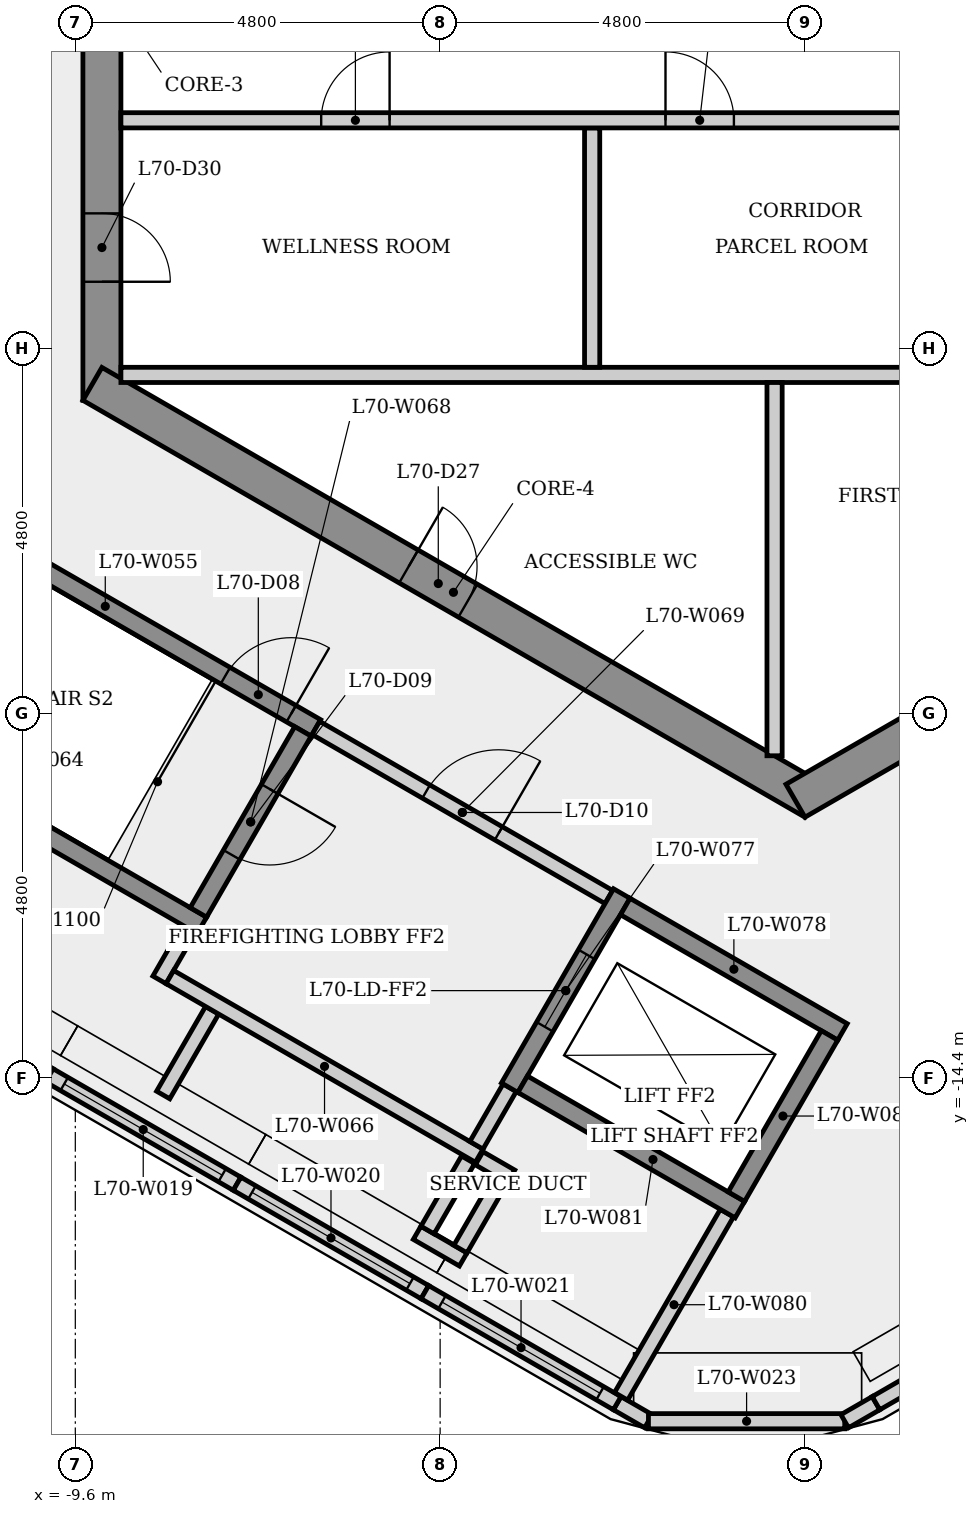
"""IFC4 building model, lengths in metres.
Left out: names, types, materials, properties, quantities, classifications, styles, units other than length and angle.
Written with IfcOpenShell. Run it as: python <this file> out.ifc"""

import sys

from ifc_helpers import new_model, si_unit, direction, frame, frame_2d, origin, place, context, subcontext, project, spatial, rectangle, extrude, element, fill, save


model = new_model("IFC4")
c1 = context("Model", 3, precision=1e-05, world=origin(), true_north=direction((0.0, 1.0)))
c2 = subcontext(c1, "Body", "Model", "MODEL_VIEW")
j1 = project(units=[si_unit("LENGTHUNIT", "METRE"), si_unit("PLANEANGLEUNIT", "RADIAN")], contexts=[c1])
p1 = place(None, origin())
s1 = spatial("IfcSite", under=j1, at=p1, CompositionType="ELEMENT")
p2 = place(p1, origin())
s2 = spatial("IfcBuilding", under=s1, at=p2, CompositionType="ELEMENT")
p3 = place(p2, frame((0.0, 0.0, 262.9)))
s3 = spatial("IfcBuildingStorey", under=s2, at=p3, CompositionType="ELEMENT", Elevation=262.9)
p4 = place(p3, frame((-9.25, 5.485, 0.0), z_axis=(0.0, 0.0, 1.0), x_axis=(0.0, -1.0, 0.0)))
e1 = element("IfcWall", 1, at=p4, inside=s3, PredefinedType="SHEAR", context=c2, shape_type="SweptSolid", body=[
    extrude(rectangle(XDim=10.97, YDim=0.5, at=frame_2d((5.485, 0.0))), origin(), (0.0, 0.0, 1.0), 4.8),
])
p5 = place(p4, frame((8.509, 0.0, 0.0)))
e2 = element("IfcOpeningElement", 2, at=p5, cuts=e1, PredefinedType="OPENING", context=c2, shape_type="SweptSolid", body=[
    extrude(rectangle(XDim=0.9, YDim=2.1, at=frame_2d((0.45, 1.05))), frame((0.0, 0.26, 0.0), z_axis=(0.0, -1.0, 0.0), x_axis=(1.0, 0.0, 0.0)), (0.0, 0.0, 1.0), 0.52),
])
p6 = place(p4, frame((4.685, 0.0, 0.0)))
e3 = element("IfcOpeningElement", 3, at=p6, cuts=e1, PredefinedType="OPENING", context=c2, shape_type="SweptSolid", body=[
    extrude(rectangle(XDim=1.6, YDim=2.1, at=frame_2d((0.8, 1.05))), frame((0.0, 0.26, 0.0), z_axis=(0.0, -1.0, 0.0), x_axis=(1.0, 0.0, 0.0)), (0.0, 0.0, 1.0), 0.52),
])
p7 = place(p3, frame((-9.375, -5.268, 0.0), z_axis=(0.0, 0.0, 1.0), x_axis=(0.866023993627, -0.500002442456, 0.0)))
e4 = element("IfcWall", 4, at=p7, inside=s3, PredefinedType="SHEAR", context=c2, shape_type="SweptSolid", body=[
    extrude(rectangle(XDim=10.97, YDim=0.5, at=frame_2d((5.485, 0.0))), origin(), (0.0, 0.0, 1.0), 4.8),
])
p8 = place(p7, frame((4.804, 0.0, 0.0)))
e5 = element("IfcOpeningElement", 5, at=p8, cuts=e4, PredefinedType="OPENING", context=c2, shape_type="SweptSolid", body=[
    extrude(rectangle(XDim=0.9, YDim=2.1, at=frame_2d((0.45, 1.05))), frame((0.0, 0.26, 0.0), z_axis=(0.0, -1.0, 0.0), x_axis=(1.0, 0.0, 0.0)), (0.0, 0.0, 1.0), 0.52),
])
p9 = place(p3, frame((-0.125, -10.753, 0.0), z_axis=(0.0, 0.0, 1.0), x_axis=(0.866023993627, 0.500002442456, 0.0)))
e6 = element("IfcWall", 6, at=p9, inside=s3, PredefinedType="SHEAR", context=c2, shape_type="SweptSolid", body=[
    extrude(rectangle(XDim=10.97, YDim=0.5, at=frame_2d((5.485, 0.0))), origin(), (0.0, 0.0, 1.0), 4.8),
])
p10 = place(p9, frame((1.918, 0.0, 0.0)))
e7 = element("IfcOpeningElement", 7, at=p10, cuts=e6, PredefinedType="OPENING", context=c2, shape_type="SweptSolid", body=[
    extrude(rectangle(XDim=0.9, YDim=2.1, at=frame_2d((0.45, 1.05))), frame((0.0, 0.26, 0.0), z_axis=(0.0, -1.0, 0.0), x_axis=(1.0, 0.0, 0.0)), (0.0, 0.0, 1.0), 0.52),
])
p11 = place(p9, frame((8.812, 0.0, 0.0)))
e8 = element("IfcOpeningElement", 8, at=p11, cuts=e6, PredefinedType="OPENING", context=c2, shape_type="SweptSolid", body=[
    extrude(rectangle(XDim=0.9, YDim=2.1, at=frame_2d((0.45, 1.05))), frame((0.0, 0.26, 0.0), z_axis=(0.0, -1.0, 0.0), x_axis=(1.0, 0.0, 0.0)), (0.0, 0.0, 1.0), 0.52),
])
p12 = place(p3, frame((-12.411, -12.94, 0.0), z_axis=(0.0, 0.0, 1.0), x_axis=(0.866027356191, -0.499996618317, 0.0)))
e9 = element("IfcWall", 9, at=p12, inside=s3, PredefinedType="SOLIDWALL", context=c2, shape_type="SweptSolid", body=[
    extrude(rectangle(XDim=2.852, YDim=0.2, at=frame_2d((1.426, 0.0))), origin(), (0.0, 0.0, 1.0), 4.8),
])
p13 = place(p12, frame((0.226, 0.0, 0.8)))
e10 = element("IfcOpeningElement", 10, at=p13, cuts=e9, PredefinedType="OPENING", context=c2, shape_type="SweptSolid", body=[
    extrude(rectangle(XDim=2.4, YDim=2.4, at=frame_2d((1.2, 1.2))), frame((0.0, 0.11, 0.0), z_axis=(0.0, -1.0, 0.0), x_axis=(1.0, 0.0, 0.0)), (0.0, 0.0, 1.0), 0.22),
])
p14 = place(p3, frame((-9.941, -14.366, 0.0), z_axis=(0.0, 0.0, 1.0), x_axis=(0.866027356191, -0.499996618317, 0.0)))
e11 = element("IfcWall", 11, at=p14, inside=s3, PredefinedType="SOLIDWALL", context=c2, shape_type="SweptSolid", body=[
    extrude(rectangle(XDim=2.852, YDim=0.2, at=frame_2d((1.426, 0.0))), origin(), (0.0, 0.0, 1.0), 4.8),
])
p15 = place(p14, frame((0.226, 0.0, 0.8)))
e12 = element("IfcOpeningElement", 12, at=p15, cuts=e11, PredefinedType="OPENING", context=c2, shape_type="SweptSolid", body=[
    extrude(rectangle(XDim=2.4, YDim=2.4, at=frame_2d((1.2, 1.2))), frame((0.0, 0.11, 0.0), z_axis=(0.0, -1.0, 0.0), x_axis=(1.0, 0.0, 0.0)), (0.0, 0.0, 1.0), 0.22),
])
p16 = place(p3, frame((-7.471, -15.792, 0.0), z_axis=(0.0, 0.0, 1.0), x_axis=(0.866017426631, -0.500013816581, 0.0)))
e13 = element("IfcWall", 13, at=p16, inside=s3, PredefinedType="SOLIDWALL", context=c2, shape_type="SweptSolid", body=[
    extrude(rectangle(XDim=2.853, YDim=0.2, at=frame_2d((1.427, 0.0))), origin(), (0.0, 0.0, 1.0), 4.8),
])
p17 = place(p16, frame((0.227, 0.0, 0.8)))
e14 = element("IfcOpeningElement", 14, at=p17, cuts=e13, PredefinedType="OPENING", context=c2, shape_type="SweptSolid", body=[
    extrude(rectangle(XDim=2.4, YDim=2.4, at=frame_2d((1.2, 1.2))), frame((0.0, 0.11, 0.0), z_axis=(0.0, -1.0, 0.0), x_axis=(1.0, 0.0, 0.0)), (0.0, 0.0, 1.0), 0.22),
])
p18 = place(p3, frame((-5.001, -17.219, 0.0), z_axis=(0.0, 0.0, 1.0), x_axis=(0.866028329077, -0.499994933211, 0.0)))
e15 = element("IfcWall", 15, at=p18, inside=s3, PredefinedType="SOLIDWALL", context=c2, shape_type="SweptSolid", body=[
    extrude(rectangle(XDim=2.921, YDim=0.2, at=frame_2d((1.461, 0.0))), origin(), (0.0, 0.0, 1.0), 4.8),
])
p19 = place(p18, frame((0.261, 0.0, 0.8)))
e16 = element("IfcOpeningElement", 16, at=p19, cuts=e15, PredefinedType="OPENING", context=c2, shape_type="SweptSolid", body=[
    extrude(rectangle(XDim=2.4, YDim=2.4, at=frame_2d((1.2, 1.2))), frame((0.0, 0.11, 0.0), z_axis=(0.0, -1.0, 0.0), x_axis=(1.0, 0.0, 0.0)), (0.0, 0.0, 1.0), 0.22),
])
p20 = place(p3, frame((-2.471, -18.68, 0.0), z_axis=(0.0, 0.0, 1.0), x_axis=(0.865988727248, -0.500063520245, 0.0)))
e17 = element("IfcWall", 17, at=p20, inside=s3, PredefinedType="SOLIDWALL", context=c2, shape_type="SweptSolid", body=[
    extrude(rectangle(XDim=0.475, YDim=0.2, at=frame_2d((0.238, 0.0))), origin(), (0.0, 0.0, 1.0), 4.8),
])
p21 = place(p3, frame((-2.059, -18.917, 0.0), z_axis=(0.0, 0.0, 1.0), x_axis=(1.0, 0.0, 0.0)))
e18 = element("IfcWall", 18, at=p21, inside=s3, PredefinedType="SOLIDWALL", context=c2, shape_type="SweptSolid", body=[
    extrude(rectangle(XDim=2.583, YDim=0.2, at=frame_2d((1.291, 0.0))), origin(), (0.0, 0.0, 1.0), 4.8),
])
p22 = place(p3, frame((0.523, -18.917, 0.0), z_axis=(0.0, 0.0, 1.0), x_axis=(0.865988727248, 0.500063520245, 0.0)))
e19 = element("IfcWall", 19, at=p22, inside=s3, PredefinedType="SOLIDWALL", context=c2, shape_type="SweptSolid", body=[
    extrude(rectangle(XDim=0.475, YDim=0.2, at=frame_2d((0.238, 0.0))), origin(), (0.0, 0.0, 1.0), 4.8),
])
p23 = place(p3, frame((0.935, -18.68, 0.0), z_axis=(0.0, 0.0, 1.0), x_axis=(0.866046690806, 0.499963127985, 0.0)))
e20 = element("IfcWall", 20, at=p23, inside=s3, PredefinedType="SOLIDWALL", context=c2, shape_type="SweptSolid", body=[
    extrude(rectangle(XDim=3.454, YDim=0.2, at=frame_2d((1.727, 0.0))), origin(), (0.0, 0.0, 1.0), 4.8),
])
p24 = place(p23, frame((0.527, 0.0, 0.8)))
e21 = element("IfcOpeningElement", 21, at=p24, cuts=e20, PredefinedType="OPENING", context=c2, shape_type="SweptSolid", body=[
    extrude(rectangle(XDim=2.4, YDim=2.4, at=frame_2d((1.2, 1.2))), frame((0.0, 0.11, 0.0), z_axis=(0.0, -1.0, 0.0), x_axis=(1.0, 0.0, 0.0)), (0.0, 0.0, 1.0), 0.22),
])
p25 = place(p3, frame((-11.977, -6.595, 0.0), z_axis=(0.0, 0.0, 1.0), x_axis=(0.866025499775, -0.499999833739, 0.0)))
e22 = element("IfcWall", 22, at=p25, inside=s3, PredefinedType="SHEAR", context=c2, shape_type="SweptSolid", body=[
    extrude(rectangle(XDim=6.4, YDim=0.25, at=frame_2d((3.2, 0.0))), origin(), (0.0, 0.0, 1.0), 4.5),
])
p26 = place(p25, frame((5.025, 0.0, 0.0)))
e23 = element("IfcOpeningElement", 23, at=p26, cuts=e22, PredefinedType="OPENING", context=c2, shape_type="SweptSolid", body=[
    extrude(rectangle(XDim=1.0, YDim=2.1, at=frame_2d((0.5, 1.05))), frame((0.0, 0.135, 0.0), z_axis=(0.0, -1.0, 0.0), x_axis=(1.0, 0.0, 0.0)), (0.0, 0.0, 1.0), 0.27),
])
p27 = place(p3, frame((-9.0, -5.15, 0.0), z_axis=(0.0, 0.0, 1.0), x_axis=(1.0, 0.0, 0.0)))
e24 = element("IfcWall", 24, at=p27, inside=s3, PredefinedType="PARTITIONING", context=c2, shape_type="SweptSolid", body=[
    extrude(rectangle(XDim=11.325, YDim=0.2, at=frame_2d((5.663, 0.0))), origin(), (0.0, 0.0, 1.0), 4.5),
])
p28 = place(p3, frame((-8.493, -13.11, 0.0), z_axis=(0.0, 0.0, 1.0), x_axis=(0.500067724834, 0.865986299303, 0.0)))
e25 = element("IfcWall", 25, at=p28, inside=s3, PredefinedType="PLUMBINGWALL", context=c2, shape_type="SweptSolid", body=[
    extrude(rectangle(XDim=0.775, YDim=0.2, at=frame_2d((0.388, 0.0))), origin(), (0.0, 0.0, 1.0), 4.5),
])
p29 = place(p3, frame((-7.935, -12.393, 0.0), z_axis=(0.0, 0.0, 1.0), x_axis=(-0.866025499775, 0.499999833739, 0.0)))
e26 = element("IfcWall", 26, at=p29, inside=s3, PredefinedType="SHEAR", context=c2, shape_type="SweptSolid", body=[
    extrude(rectangle(XDim=6.4, YDim=0.25, at=frame_2d((3.2, 0.0))), origin(), (0.0, 0.0, 1.0), 4.5),
])
p30 = place(p3, frame((-7.8, -13.51, 0.0), z_axis=(0.0, 0.0, 1.0), x_axis=(-0.499892088923, -0.86608769731, 0.0)))
e27 = element("IfcWall", 27, at=p30, inside=s3, PredefinedType="PLUMBINGWALL", context=c2, shape_type="SweptSolid", body=[
    extrude(rectangle(XDim=1.287, YDim=0.2, at=frame_2d((0.644, 0.0))), origin(), (0.0, 0.0, 1.0), 4.5),
])
p31 = place(p3, frame((-8.356, -13.073, 0.0), z_axis=(0.0, 0.0, 1.0), x_axis=(0.866038532462, -0.499977259774, 0.0)))
e28 = element("IfcWall", 28, at=p31, inside=s3, PredefinedType="PLUMBINGWALL", context=c2, shape_type="SweptSolid", body=[
    extrude(rectangle(XDim=4.7, YDim=0.2, at=frame_2d((2.35, 0.0))), origin(), (0.0, 0.0, 1.0), 4.5),
])
p32 = place(p3, frame((-6.605, -9.841, 0.0), z_axis=(0.0, 0.0, 1.0), x_axis=(-0.499996545922, -0.866027397988, 0.0)))
e29 = element("IfcWall", 29, at=p32, inside=s3, PredefinedType="SHEAR", context=c2, shape_type="SweptSolid", body=[
    extrude(rectangle(XDim=2.75, YDim=0.25, at=frame_2d((1.375, 0.0))), origin(), (0.0, 0.0, 1.0), 4.5),
])
p33 = place(p32, frame((0.875, 0.0, 0.0)))
e30 = element("IfcOpeningElement", 30, at=p33, cuts=e29, PredefinedType="OPENING", context=c2, shape_type="SweptSolid", body=[
    extrude(rectangle(XDim=1.0, YDim=2.1, at=frame_2d((0.5, 1.05))), frame((0.0, 0.135, 0.0), z_axis=(0.0, -1.0, 0.0), x_axis=(1.0, 0.0, 0.0)), (0.0, 0.0, 1.0), 0.27),
])
p34 = place(p3, frame((-6.435, -9.795, 0.0), z_axis=(0.0, 0.0, 1.0), x_axis=(0.866012907634, -0.500021643343, 0.0)))
e31 = element("IfcWall", 31, at=p34, inside=s3, PredefinedType="PARTITIONING", context=c2, shape_type="SweptSolid", body=[
    extrude(rectangle(XDim=4.45, YDim=0.2, at=frame_2d((2.225, 0.0))), origin(), (0.0, 0.0, 1.0), 4.5),
])
p35 = place(p34, frame((1.675, 0.0, 0.0)))
e32 = element("IfcOpeningElement", 32, at=p35, cuts=e31, PredefinedType="OPENING", context=c2, shape_type="SweptSolid", body=[
    extrude(rectangle(XDim=1.1, YDim=2.1, at=frame_2d((0.55, 1.05))), frame((0.0, 0.11, 0.0), z_axis=(0.0, -1.0, 0.0), x_axis=(1.0, 0.0, 0.0)), (0.0, 0.0, 1.0), 0.22),
])
p36 = place(p3, frame((-3.885, -14.529, 0.0), z_axis=(0.0, 0.0, 1.0), x_axis=(-0.499859285417, -0.866106630146, 0.0)))
e33 = element("IfcWall", 33, at=p36, inside=s3, PredefinedType="PLUMBINGWALL", context=c2, shape_type="SweptSolid", body=[
    extrude(rectangle(XDim=0.875, YDim=0.2, at=frame_2d((0.438, 0.0))), origin(), (0.0, 0.0, 1.0), 4.5),
])
p37 = place(p3, frame((-2.8, -1.9, 0.0), z_axis=(0.0, 0.0, 1.0), x_axis=(0.0, -1.0, 0.0)))
e34 = element("IfcWall", 34, at=p37, inside=s3, PredefinedType="PARTITIONING", context=c2, shape_type="SweptSolid", body=[
    extrude(rectangle(XDim=3.15, YDim=0.2, at=frame_2d((1.575, 0.0))), origin(), (0.0, 0.0, 1.0), 4.5),
])
p38 = place(p3, frame((-9.0, -1.8, 0.0), z_axis=(0.0, 0.0, 1.0), x_axis=(1.0, 0.0, 0.0)))
e35 = element("IfcWall", 35, at=p38, inside=s3, PredefinedType="PARTITIONING", context=c2, shape_type="SweptSolid", body=[
    extrude(rectangle(XDim=11.325, YDim=0.2, at=frame_2d((5.663, 0.0))), origin(), (0.0, 0.0, 1.0), 4.5),
])
p39 = place(p38, frame((2.635, 0.0, 0.0)))
e36 = element("IfcOpeningElement", 36, at=p39, cuts=e35, PredefinedType="OPENING", context=c2, shape_type="SweptSolid", body=[
    extrude(rectangle(XDim=0.9, YDim=2.1, at=frame_2d((0.45, 1.05))), frame((0.0, 0.11, 0.0), z_axis=(0.0, -1.0, 0.0), x_axis=(1.0, 0.0, 0.0)), (0.0, 0.0, 1.0), 0.22),
])
p40 = place(p38, frame((7.165, 0.0, 0.0)))
e37 = element("IfcOpeningElement", 37, at=p40, cuts=e35, PredefinedType="OPENING", context=c2, shape_type="SweptSolid", body=[
    extrude(rectangle(XDim=0.9, YDim=2.1, at=frame_2d((0.45, 1.05))), frame((0.0, 0.11, 0.0), z_axis=(0.0, -1.0, 0.0), x_axis=(1.0, 0.0, 0.0)), (0.0, 0.0, 1.0), 0.22),
])
p41 = place(p3, frame((-2.41, -11.974, 0.0), z_axis=(0.0, 0.0, 1.0), x_axis=(-0.500001826776, -0.866024349092, 0.0)))
e38 = element("IfcWall", 38, at=p41, inside=s3, PredefinedType="SHEAR", context=c2, shape_type="SweptSolid", body=[
    extrude(rectangle(XDim=2.95, YDim=0.25, at=frame_2d((1.475, 0.0))), origin(), (0.0, 0.0, 1.0), 4.5),
])
p42 = place(p41, frame((0.925, 0.0, 0.0)))
e39 = element("IfcOpeningElement", 39, at=p42, cuts=e38, PredefinedType="OPENING", context=c2, shape_type="SweptSolid", body=[
    extrude(rectangle(XDim=1.1, YDim=2.1, at=frame_2d((0.55, 1.05))), frame((0.0, 0.135, 0.0), z_axis=(0.0, -1.0, 0.0), x_axis=(1.0, 0.0, 0.0)), (0.0, 0.0, 1.0), 0.27),
])
p43 = place(p3, frame((-2.364, -12.145, 0.0), z_axis=(0.0, 0.0, 1.0), x_axis=(0.866040211805, -0.499974350878, 0.0)))
e40 = element("IfcWall", 40, at=p43, inside=s3, PredefinedType="SHEAR", context=c2, shape_type="SweptSolid", body=[
    extrude(rectangle(XDim=3.3, YDim=0.25, at=frame_2d((1.65, 0.0))), origin(), (0.0, 0.0, 1.0), 4.5),
])
p44 = place(p3, frame((-1.027, -16.179, 0.0), z_axis=(0.0, 0.0, 1.0), x_axis=(-0.500016013541, -0.866016158165, 0.0)))
e41 = element("IfcWall", 41, at=p44, inside=s3, PredefinedType="PLUMBINGWALL", context=c2, shape_type="SweptSolid", body=[
    extrude(rectangle(XDim=2.784, YDim=0.2, at=frame_2d((1.392, 0.0))), origin(), (0.0, 0.0, 1.0), 4.5),
])
p45 = place(p3, frame((-0.856, -16.133, 0.0), z_axis=(0.0, 0.0, 1.0), x_axis=(-0.866021716278, 0.500006386895, 0.0)))
e42 = element("IfcWall", 42, at=p45, inside=s3, PredefinedType="SHEAR", context=c2, shape_type="SweptSolid", body=[
    extrude(rectangle(XDim=3.3, YDim=0.25, at=frame_2d((1.65, 0.0))), origin(), (0.0, 0.0, 1.0), 4.5),
])
p46 = place(p3, frame((-0.4, -5.25, 0.0), z_axis=(0.0, 0.0, 1.0), x_axis=(0.0, -1.0, 0.0)))
e43 = element("IfcWall", 43, at=p46, inside=s3, PredefinedType="PARTITIONING", context=c2, shape_type="SweptSolid", body=[
    extrude(rectangle(XDim=4.911, YDim=0.2, at=frame_2d((2.456, 0.0))), origin(), (0.0, 0.0, 1.0), 4.5),
])
p47 = place(p3, frame((0.323, -13.841, 0.0), z_axis=(0.0, 0.0, 1.0), x_axis=(-0.500061746146, -0.865989751695, 0.0)))
e44 = element("IfcWall", 44, at=p47, inside=s3, PredefinedType="SHEAR", context=c2, shape_type="SweptSolid", body=[
    extrude(rectangle(XDim=2.45, YDim=0.25, at=frame_2d((1.225, 0.0))), origin(), (0.0, 0.0, 1.0), 4.5),
])
p48 = place(p3, frame((-4.497, -16.788, 0.0), z_axis=(0.0, 0.0, 1.0), x_axis=(-0.866110083249, 0.499853302173, 0.0)))
e45 = element("IfcWall", 45, at=p48, inside=s3, PredefinedType="PLUMBINGWALL", context=c2, shape_type="SweptSolid", body=[
    extrude(rectangle(XDim=0.7, YDim=0.2, at=frame_2d((0.35, 0.0))), origin(), (0.0, 0.0, 1.0), 4.5),
])
p49 = place(p3, frame((-4.966, -16.402, 0.0), z_axis=(0.0, 0.0, 1.0), x_axis=(0.499927021214, 0.866067534006, 0.0)))
e46 = element("IfcWall", 46, at=p49, inside=s3, PredefinedType="PLUMBINGWALL", context=c2, shape_type="SweptSolid", body=[
    extrude(rectangle(XDim=1.068, YDim=0.2, at=frame_2d((0.534, 0.0))), origin(), (0.0, 0.0, 1.0), 4.5),
])
p50 = place(p3, frame((-4.287, -15.458, 0.0), z_axis=(0.0, 0.0, 1.0), x_axis=(0.866093196455, -0.499882561262, 0.0)))
e47 = element("IfcWall", 47, at=p50, inside=s3, PredefinedType="PLUMBINGWALL", context=c2, shape_type="SweptSolid", body=[
    extrude(rectangle(XDim=0.484, YDim=0.2, at=frame_2d((0.242, 0.0))), origin(), (0.0, 0.0, 1.0), 4.5),
])
p51 = place(p3, frame((-4.004, -15.736, 0.0), z_axis=(0.0, 0.0, 1.0), x_axis=(-0.500062184469, -0.865989498588, 0.0)))
e48 = element("IfcWall", 48, at=p51, inside=s3, PredefinedType="PLUMBINGWALL", context=c2, shape_type="SweptSolid", body=[
    extrude(rectangle(XDim=1.057, YDim=0.2, at=frame_2d((0.529, 0.0))), origin(), (0.0, 0.0, 1.0), 4.5),
])
p52 = place(p15, origin())
e49 = element("IfcWindow", 49, at=p52, inside=s3, PartitioningType="SINGLE_PANEL", PredefinedType="WINDOW", context=c2, shape_type="SweptSolid", body=[
    extrude(rectangle(XDim=2.4, YDim=2.4, at=frame_2d((1.2, 1.2))), frame((0.0, 0.03, 0.0), z_axis=(0.0, -1.0, 0.0), x_axis=(1.0, 0.0, 0.0)), (0.0, 0.0, 1.0), 0.06),
])
fill(e12, e49)
p53 = place(p17, origin())
e50 = element("IfcWindow", 50, at=p53, inside=s3, PartitioningType="SINGLE_PANEL", PredefinedType="WINDOW", context=c2, shape_type="SweptSolid", body=[
    extrude(rectangle(XDim=2.4, YDim=2.4, at=frame_2d((1.2, 1.2))), frame((0.0, 0.03, 0.0), z_axis=(0.0, -1.0, 0.0), x_axis=(1.0, 0.0, 0.0)), (0.0, 0.0, 1.0), 0.06),
])
fill(e14, e50)
p54 = place(p19, origin())
e51 = element("IfcWindow", 51, at=p54, inside=s3, PartitioningType="SINGLE_PANEL", PredefinedType="WINDOW", context=c2, shape_type="SweptSolid", body=[
    extrude(rectangle(XDim=2.4, YDim=2.4, at=frame_2d((1.2, 1.2))), frame((0.0, 0.03, 0.0), z_axis=(0.0, -1.0, 0.0), x_axis=(1.0, 0.0, 0.0)), (0.0, 0.0, 1.0), 0.06),
])
fill(e16, e51)
p55 = place(p39, origin())
e52 = element("IfcDoor", 52, at=p55, inside=s3, OperationType="SINGLE_SWING_RIGHT", PredefinedType="DOOR", context=c2, shape_type="SweptSolid", body=[
    extrude(rectangle(XDim=0.9, YDim=2.1, at=frame_2d((0.45, 1.05))), frame((0.0, 0.025, 0.0), z_axis=(0.0, -1.0, 0.0), x_axis=(1.0, 0.0, 0.0)), (0.0, 0.0, 1.0), 0.05),
])
fill(e36, e52)
p56 = place(p40, origin())
e53 = element("IfcDoor", 53, at=p56, inside=s3, OperationType="SINGLE_SWING_LEFT", PredefinedType="DOOR", context=c2, shape_type="SweptSolid", body=[
    extrude(rectangle(XDim=0.9, YDim=2.1, at=frame_2d((0.45, 1.05))), frame((0.0, 0.025, 0.0), z_axis=(0.0, -1.0, 0.0), x_axis=(1.0, 0.0, 0.0)), (0.0, 0.0, 1.0), 0.05),
])
fill(e37, e53)
p57 = place(p26, origin())
e54 = element("IfcDoor", 54, at=p57, inside=s3, OperationType="SINGLE_SWING_RIGHT", PredefinedType="DOOR", context=c2, shape_type="SweptSolid", body=[
    extrude(rectangle(XDim=1.0, YDim=2.1, at=frame_2d((0.5, 1.05))), frame((0.0, 0.025, 0.0), z_axis=(0.0, -1.0, 0.0), x_axis=(1.0, 0.0, 0.0)), (0.0, 0.0, 1.0), 0.05),
])
fill(e23, e54)
p58 = place(p33, origin())
e55 = element("IfcDoor", 55, at=p58, inside=s3, OperationType="SINGLE_SWING_LEFT", PredefinedType="DOOR", context=c2, shape_type="SweptSolid", body=[
    extrude(rectangle(XDim=1.0, YDim=2.1, at=frame_2d((0.5, 1.05))), frame((0.0, 0.025, 0.0), z_axis=(0.0, -1.0, 0.0), x_axis=(1.0, 0.0, 0.0)), (0.0, 0.0, 1.0), 0.05),
])
fill(e30, e55)
p59 = place(p35, origin())
e56 = element("IfcDoor", 56, at=p59, inside=s3, OperationType="SINGLE_SWING_RIGHT", PredefinedType="DOOR", context=c2, shape_type="SweptSolid", body=[
    extrude(rectangle(XDim=1.1, YDim=2.1, at=frame_2d((0.55, 1.05))), frame((0.0, 0.025, 0.0), z_axis=(0.0, -1.0, 0.0), x_axis=(1.0, 0.0, 0.0)), (0.0, 0.0, 1.0), 0.05),
])
fill(e32, e56)
p60 = place(p42, origin())
e57 = element("IfcDoor", 57, at=p60, inside=s3, OperationType="SLIDING_TO_LEFT", PredefinedType="DOOR", context=c2, shape_type="SweptSolid", body=[
    extrude(rectangle(XDim=1.1, YDim=2.1, at=frame_2d((0.55, 1.05))), frame((0.0, 0.025, 0.0), z_axis=(0.0, -1.0, 0.0), x_axis=(1.0, 0.0, 0.0)), (0.0, 0.0, 1.0), 0.05),
])
fill(e39, e57)
p61 = place(p8, origin())
e58 = element("IfcDoor", 58, at=p61, inside=s3, OperationType="SINGLE_SWING_LEFT", PredefinedType="DOOR", context=c2, shape_type="SweptSolid", body=[
    extrude(rectangle(XDim=0.9, YDim=2.1, at=frame_2d((0.45, 1.05))), frame((0.0, 0.025, 0.0), z_axis=(0.0, -1.0, 0.0), x_axis=(1.0, 0.0, 0.0)), (0.0, 0.0, 1.0), 0.05),
])
fill(e5, e58)
p62 = place(p5, origin())
e59 = element("IfcDoor", 59, at=p62, inside=s3, OperationType="SINGLE_SWING_RIGHT", PredefinedType="DOOR", context=c2, shape_type="SweptSolid", body=[
    extrude(rectangle(XDim=0.9, YDim=2.1, at=frame_2d((0.45, 1.05))), frame((0.0, 0.025, 0.0), z_axis=(0.0, -1.0, 0.0), x_axis=(1.0, 0.0, 0.0)), (0.0, 0.0, 1.0), 0.05),
])
fill(e2, e59)
save(model, sys.argv[1])
